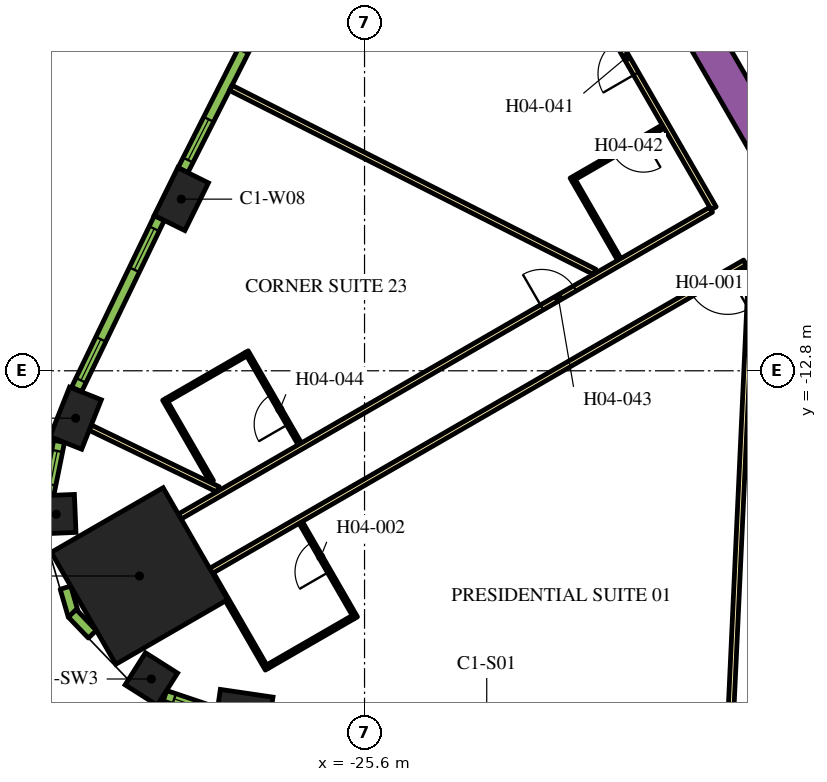
"""IFC4 building model, lengths in metres.
Left out: names, types, materials, properties, quantities, classifications, styles, units other than length and angle.
Written with IfcOpenShell. Run it as: python <this file> out.ifc"""

import sys

from ifc_helpers import new_model, si_unit, direction, frame, frame_2d, origin, origin_2d, place, context, subcontext, project, spatial, rectangle, extrude, element, fill, save


model = new_model("IFC4")
c1 = context("Model", 3, precision=1e-05, world=origin(), true_north=direction((0.0, 1.0)))
c2 = subcontext(c1, "Body", "Model", "MODEL_VIEW")
j1 = project(units=[si_unit("LENGTHUNIT", "METRE"), si_unit("PLANEANGLEUNIT", "RADIAN")], contexts=[c1])
p1 = place(None, origin())
s1 = spatial("IfcSite", under=j1, at=p1, CompositionType="ELEMENT")
p2 = place(p1, origin())
s2 = spatial("IfcBuilding", under=s1, at=p2, CompositionType="ELEMENT")
p3 = place(p2, frame((0.0, 0.0, 66.6)))
s3 = spatial("IfcBuildingStorey", under=s2, at=p3, CompositionType="ELEMENT", Elevation=66.6)
p4 = place(p3, frame((-31.522, -18.199, 0.0), z_axis=(0.0, 0.0, 1.0), x_axis=(-0.866025403784, -0.5, 0.0)))
e1 = element("IfcColumn", 1, at=p4, inside=s3, PredefinedType="COLUMN", context=c2, shape_type="SweptSolid", body=[
    extrude(rectangle(XDim=3.4, YDim=3.4, at=origin_2d()), origin(), (0.0, 0.0, 1.0), 3.9),
])
for number, where, z_axis, x_axis in (
    (2, (-28.767, -21.731, 0.0), (0.0, 0.0, 1.0), (0.989, -0.145, 0.0)),
    (3, (-30.421, -8.284, 0.0), (0.0, 0.0, 1.0), (-0.443, -0.897, 0.0)),
    (4, (-33.203, -14.047, 0.0), (0.0, 0.0, 1.0), (-0.369, -0.929, 0.0)),
):
    element("IfcColumn", number, at=place(p3, frame(where, z_axis=z_axis, x_axis=x_axis)), inside=s3, PredefinedType="COLUMN", context=c2, shape_type="SweptSolid", body=[
        extrude(rectangle(XDim=1.4, YDim=0.9, at=origin_2d()), origin(), (0.0, 0.0, 1.0), 3.9),
    ])
for number, where, z_axis, x_axis in (
    (5, (-33.713, -16.574, 0.0), (0.0, 0.0, 1.0), (0.042, -0.999, 0.0)),
    (6, (-31.21, -20.91, 0.0), (0.0, 0.0, 1.0), (0.844, -0.536, 0.0)),
):
    element("IfcColumn", number, at=place(p3, frame(where, z_axis=z_axis, x_axis=x_axis)), inside=s3, PredefinedType="COLUMN", context=c2, shape_type="SweptSolid", body=[
        extrude(rectangle(XDim=1.0, YDim=1.0, at=origin_2d()), origin(), (0.0, 0.0, 1.0), 3.9),
    ])
p5 = place(p3, frame((-12.134, -11.883, 0.0), z_axis=(0.0, 0.0, 1.0), x_axis=(-0.500005339912, 0.866022320763, 0.0)))
e7 = element("IfcWall", 7, at=p5, inside=s3, PredefinedType="SOLIDWALL", context=c2, shape_type="SweptSolid", body=[
    extrude(rectangle(XDim=9.488, YDim=0.9, at=frame_2d((4.744, 0.0))), origin(), (0.0, 0.0, 1.0), 3.9),
])
p6 = place(p3, frame((-16.412, -8.523, 0.0), z_axis=(0.0, 0.0, 1.0), x_axis=(-0.500001929737, 0.866024289647, 0.0)))
e8 = element("IfcWall", 8, at=p6, inside=s3, PredefinedType="PARTITIONING", context=c2, shape_type="SweptSolid", body=[
    extrude(rectangle(XDim=5.268, YDim=0.15, at=frame_2d((2.634, 0.0))), origin(), (0.0, 0.0, 1.0), 2.75),
])
p7 = place(p6, frame((4.088, 0.0, 0.0)))
e9 = element("IfcOpeningElement", 9, at=p7, cuts=e8, PredefinedType="OPENING", context=c2, shape_type="SweptSolid", body=[
    extrude(rectangle(XDim=1.0, YDim=2.1, at=frame_2d((0.5, 1.05))), frame((0.0, 0.085, 0.0), z_axis=(0.0, -1.0, 0.0), x_axis=(1.0, 0.0, 0.0)), (0.0, 0.0, 1.0), 0.17),
])
p8 = place(p3, frame((-30.463, -16.635, 0.0), z_axis=(0.0, 0.0, 1.0), x_axis=(0.866022394896, 0.500005211512, 0.0)))
e10 = element("IfcWall", 10, at=p8, inside=s3, PredefinedType="PARTITIONING", context=c2, shape_type="SweptSolid", body=[
    extrude(rectangle(XDim=16.144, YDim=0.15, at=frame_2d((8.072, 0.0))), origin(), (0.0, 0.0, 1.0), 2.75),
])
p9 = place(p8, frame((11.004, 0.0, 0.0)))
e11 = element("IfcOpeningElement", 11, at=p9, cuts=e10, PredefinedType="OPENING", context=c2, shape_type="SweptSolid", body=[
    extrude(rectangle(XDim=1.0, YDim=2.1, at=frame_2d((0.5, 1.05))), frame((0.0, 0.085, 0.0), z_axis=(0.0, -1.0, 0.0), x_axis=(1.0, 0.0, 0.0)), (0.0, 0.0, 1.0), 0.17),
])
p10 = place(p3, frame((-15.587, -9.952, 0.0), z_axis=(0.0, 0.0, 1.0), x_axis=(-0.866022197818, -0.500005552856, 0.0)))
e12 = element("IfcWall", 12, at=p10, inside=s3, PredefinedType="PARTITIONING", context=c2, shape_type="SweptSolid", body=[
    extrude(rectangle(XDim=16.224, YDim=0.15, at=frame_2d((8.112, 0.0))), origin(), (0.0, 0.0, 1.0), 2.75),
])
p11 = place(p10, frame((0.527, 0.0, 0.0)))
e13 = element("IfcOpeningElement", 13, at=p11, cuts=e12, PredefinedType="OPENING", context=c2, shape_type="SweptSolid", body=[
    extrude(rectangle(XDim=1.1, YDim=2.1, at=frame_2d((0.55, 1.05))), frame((0.0, 0.085, 0.0), z_axis=(0.0, -1.0, 0.0), x_axis=(1.0, 0.0, 0.0)), (0.0, 0.0, 1.0), 0.17),
])
p12 = place(p3, frame((-12.918, -14.575, 0.0), z_axis=(0.0, 0.0, 1.0), x_axis=(-0.500009150678, 0.866020120573, 0.0)))
e14 = element("IfcWall", 14, at=p12, inside=s3, PredefinedType="PARTITIONING", context=c2, shape_type="SweptSolid", body=[
    extrude(rectangle(XDim=5.258, YDim=0.15, at=frame_2d((2.629, 0.0))), origin(), (0.0, 0.0, 1.0), 2.75),
])
p13 = place(p3, frame((-32.817, -14.296, 0.0), z_axis=(0.0, 0.0, 1.0), x_axis=(0.900616957918, -0.434613730927, 0.0)))
e15 = element("IfcWall", 15, at=p13, inside=s3, PredefinedType="PARTITIONING", context=c2, shape_type="SweptSolid", body=[
    extrude(rectangle(XDim=3.733, YDim=0.15, at=frame_2d((1.867, 0.0))), origin(), (0.0, 0.0, 1.0), 2.75),
])
p14 = place(p3, frame((-29.12, -5.356, 0.0), z_axis=(0.0, 0.0, 1.0), x_axis=(0.892401965553, -0.451241323327, 0.0)))
e16 = element("IfcWall", 16, at=p14, inside=s3, PredefinedType="PARTITIONING", context=c2, shape_type="SweptSolid", body=[
    extrude(rectangle(XDim=10.729, YDim=0.15, at=frame_2d((5.364, 0.0))), origin(), (0.0, 0.0, 1.0), 2.75),
])
p15 = place(p3, frame((-15.973, -22.109, 0.0), z_axis=(0.0, 0.0, 1.0), x_axis=(0.046191717129, 0.998932592955, 0.0)))
e17 = element("IfcWall", 17, at=p15, inside=s3, PredefinedType="PARTITIONING", context=c2, shape_type="SweptSolid", body=[
    extrude(rectangle(XDim=11.638, YDim=0.15, at=frame_2d((5.819, 0.0))), origin(), (0.0, 0.0, 1.0), 2.75),
])
p16 = place(p3, frame((-25.829, -19.3, 0.0), z_axis=(0.0, 0.0, 1.0), x_axis=(-0.50005036918, 0.865996321171, 0.0)))
e18 = element("IfcWall", 18, at=p16, inside=s3, PredefinedType="PARTITIONING", context=c2, shape_type="SweptSolid", body=[
    extrude(rectangle(XDim=2.9, YDim=0.1, at=frame_2d((1.45, 0.0))), origin(), (0.0, 0.0, 1.0), 2.75),
])
p17 = place(p16, frame((1.4, 0.0, 0.0)))
e19 = element("IfcOpeningElement", 19, at=p17, cuts=e18, PredefinedType="OPENING", context=c2, shape_type="SweptSolid", body=[
    extrude(rectangle(XDim=0.9, YDim=2.1, at=frame_2d((0.45, 1.05))), frame((0.0, 0.06, 0.0), z_axis=(0.0, -1.0, 0.0), x_axis=(1.0, 0.0, 0.0)), (0.0, 0.0, 1.0), 0.12),
])
p18 = place(p3, frame((-25.897, -19.282, 0.0), z_axis=(0.0, 0.0, 1.0), x_axis=(-0.866021400173, -0.500006934395, 0.0)))
e20 = element("IfcWall", 20, at=p18, inside=s3, PredefinedType="PARTITIONING", context=c2, shape_type="SweptSolid", body=[
    extrude(rectangle(XDim=2.6, YDim=0.1, at=frame_2d((1.3, 0.0))), origin(), (0.0, 0.0, 1.0), 2.75),
])
p19 = place(p3, frame((-29.617, -18.139, 0.0), z_axis=(0.0, 0.0, 1.0), x_axis=(0.499987231761, -0.866032775405, 0.0)))
e21 = element("IfcWall", 21, at=p19, inside=s3, PredefinedType="PARTITIONING", context=c2, shape_type="SweptSolid", body=[
    extrude(rectangle(XDim=2.9, YDim=0.1, at=frame_2d((1.45, 0.0))), origin(), (0.0, 0.0, 1.0), 2.75),
])
p20 = place(p3, frame((-17.74, -6.373, 0.0), z_axis=(0.0, 0.0, 1.0), x_axis=(-0.866018616679, -0.500011755427, 0.0)))
e22 = element("IfcWall", 22, at=p20, inside=s3, PredefinedType="PARTITIONING", context=c2, shape_type="SweptSolid", body=[
    extrude(rectangle(XDim=2.8, YDim=0.1, at=frame_2d((1.4, 0.0))), origin(), (0.0, 0.0, 1.0), 2.75),
])
p21 = place(p20, frame((0.6, 0.0, 0.0)))
e23 = element("IfcOpeningElement", 23, at=p21, cuts=e22, PredefinedType="OPENING", context=c2, shape_type="SweptSolid", body=[
    extrude(rectangle(XDim=0.9, YDim=2.1, at=frame_2d((0.45, 1.05))), frame((0.0, 0.06, 0.0), z_axis=(0.0, -1.0, 0.0), x_axis=(1.0, 0.0, 0.0)), (0.0, 0.0, 1.0), 0.12),
])
p22 = place(p3, frame((-20.092, -7.8, 0.0), z_axis=(0.0, 0.0, 1.0), x_axis=(0.499940577336, -0.866059708757, 0.0)))
e24 = element("IfcWall", 24, at=p22, inside=s3, PredefinedType="PARTITIONING", context=c2, shape_type="SweptSolid", body=[
    extrude(rectangle(XDim=2.39, YDim=0.1, at=frame_2d((1.195, 0.0))), origin(), (0.0, 0.0, 1.0), 2.75),
])
p23 = place(p3, frame((-27.304, -14.725, 0.0), z_axis=(0.0, 0.0, 1.0), x_axis=(-0.49998411664, 0.866034573852, 0.0)))
e25 = element("IfcWall", 25, at=p23, inside=s3, PredefinedType="PARTITIONING", context=c2, shape_type="SweptSolid", body=[
    extrude(rectangle(XDim=2.8, YDim=0.1, at=frame_2d((1.4, 0.0))), origin(), (0.0, 0.0, 1.0), 2.75),
])
p24 = place(p23, frame((0.6, 0.0, 0.0)))
e26 = element("IfcOpeningElement", 26, at=p24, cuts=e25, PredefinedType="OPENING", context=c2, shape_type="SweptSolid", body=[
    extrude(rectangle(XDim=0.9, YDim=2.1, at=frame_2d((0.45, 1.05))), frame((0.0, 0.06, 0.0), z_axis=(0.0, -1.0, 0.0), x_axis=(1.0, 0.0, 0.0)), (0.0, 0.0, 1.0), 0.12),
])
p25 = place(p3, frame((-28.722, -12.368, 0.0), z_axis=(0.0, 0.0, 1.0), x_axis=(-0.866050077142, -0.499957262057, 0.0)))
e27 = element("IfcWall", 27, at=p25, inside=s3, PredefinedType="PARTITIONING", context=c2, shape_type="SweptSolid", body=[
    extrude(rectangle(XDim=2.4, YDim=0.1, at=frame_2d((1.2, 0.0))), origin(), (0.0, 0.0, 1.0), 2.75),
])
p26 = place(p3, frame((-29.619, -15.715, 0.0), z_axis=(0.0, 0.0, 1.0), x_axis=(-0.500004234368, 0.866022959057, 0.0)))
e28 = element("IfcWall", 28, at=p26, inside=s3, PredefinedType="PARTITIONING", context=c2, shape_type="SweptSolid", body=[
    extrude(rectangle(XDim=2.5, YDim=0.1, at=frame_2d((1.25, 0.0))), origin(), (0.0, 0.0, 1.0), 2.75),
])
p27 = place(p3, frame((-28.122, -3.06, 0.0), z_axis=(0.0, 0.0, 1.0), x_axis=(-0.451233929645, -0.892405704115, 0.0)))
e29 = element("IfcWall", 29, at=p27, inside=s3, PredefinedType="SOLIDWALL", context=c2, shape_type="SweptSolid", body=[
    extrude(rectangle(XDim=4.998, YDim=0.29, at=frame_2d((2.499, 0.0))), origin(), (0.0, 0.0, 1.0), 3.65),
])
p28 = place(p27, frame((0.297, 0.0, 0.9)))
e30 = element("IfcOpeningElement", 30, at=p28, cuts=e29, PredefinedType="OPENING", context=c2, shape_type="SweptSolid", body=[
    extrude(rectangle(XDim=1.2, YDim=2.15, at=frame_2d((0.6, 1.075))), frame((0.0, 0.155, 0.0), z_axis=(0.0, -1.0, 0.0), x_axis=(1.0, 0.0, 0.0)), (0.0, 0.0, 1.0), 0.31),
])
p29 = place(p27, frame((3.501, 0.0, 0.9)))
e31 = element("IfcOpeningElement", 31, at=p29, cuts=e29, PredefinedType="OPENING", context=c2, shape_type="SweptSolid", body=[
    extrude(rectangle(XDim=1.2, YDim=2.15, at=frame_2d((0.6, 1.075))), frame((0.0, 0.155, 0.0), z_axis=(0.0, -1.0, 0.0), x_axis=(1.0, 0.0, 0.0)), (0.0, 0.0, 1.0), 0.31),
])
p30 = place(p3, frame((-31.0, -8.782, 0.0), z_axis=(0.0, 0.0, 1.0), x_axis=(-0.434664499056, -0.900592456808, 0.0)))
e32 = element("IfcWall", 32, at=p30, inside=s3, PredefinedType="SOLIDWALL", context=c2, shape_type="SweptSolid", body=[
    extrude(rectangle(XDim=5.006, YDim=0.29, at=frame_2d((2.503, 0.0))), origin(), (0.0, 0.0, 1.0), 3.65),
])
p31 = place(p30, frame((0.31, 0.0, 0.9)))
e33 = element("IfcOpeningElement", 33, at=p31, cuts=e32, PredefinedType="OPENING", context=c2, shape_type="SweptSolid", body=[
    extrude(rectangle(XDim=1.2, YDim=2.15, at=frame_2d((0.6, 1.075))), frame((0.0, 0.155, 0.0), z_axis=(0.0, -1.0, 0.0), x_axis=(1.0, 0.0, 0.0)), (0.0, 0.0, 1.0), 0.31),
])
p32 = place(p30, frame((3.541, 0.0, 0.9)))
e34 = element("IfcOpeningElement", 34, at=p32, cuts=e32, PredefinedType="OPENING", context=c2, shape_type="SweptSolid", body=[
    extrude(rectangle(XDim=1.2, YDim=2.15, at=frame_2d((0.6, 1.075))), frame((0.0, 0.155, 0.0), z_axis=(0.0, -1.0, 0.0), x_axis=(1.0, 0.0, 0.0)), (0.0, 0.0, 1.0), 0.31),
])
p33 = place(p3, frame((-33.637, -14.657, 0.0), z_axis=(0.0, 0.0, 1.0), x_axis=(-0.198106888228, -0.980180422594, 0.0)))
e35 = element("IfcWall", 35, at=p33, inside=s3, PredefinedType="SOLIDWALL", context=c2, shape_type="SweptSolid", body=[
    extrude(rectangle(XDim=1.415, YDim=0.29, at=frame_2d((0.708, 0.0))), origin(), (0.0, 0.0, 1.0), 3.65),
])
p34 = place(p33, frame((0.257, 0.0, 0.9)))
e36 = element("IfcOpeningElement", 36, at=p34, cuts=e35, PredefinedType="OPENING", context=c2, shape_type="SweptSolid", body=[
    extrude(rectangle(XDim=0.9, YDim=2.15, at=frame_2d((0.45, 1.075))), frame((0.0, 0.155, 0.0), z_axis=(0.0, -1.0, 0.0), x_axis=(1.0, 0.0, 0.0)), (0.0, 0.0, 1.0), 0.31),
])
for number, where, z_axis, x_axis in (
    (37, (-33.47, -18.507, 0.0), (0.0, 0.0, 1.0), (0.279, -0.96, 0.0)),
    (38, (-33.291, -19.181, 0.0), (0.0, 0.0, 1.0), (0.692, -0.722, 0.0)),
):
    element("IfcWall", number, at=place(p3, frame(where, z_axis=z_axis, x_axis=x_axis)), inside=s3, PredefinedType="SOLIDWALL", context=c2, shape_type="SweptSolid", body=[
        extrude(rectangle(XDim=0.764, YDim=0.29, at=frame_2d((0.382, 0.0))), origin(), (0.0, 0.0, 1.0), 3.65),
    ])
p35 = place(p3, frame((-30.853, -21.352, 0.0), z_axis=(0.0, 0.0, 1.0), x_axis=(0.947903891592, -0.318556450734, 0.0)))
e39 = element("IfcWall", 39, at=p35, inside=s3, PredefinedType="SOLIDWALL", context=c2, shape_type="SweptSolid", body=[
    extrude(rectangle(XDim=1.415, YDim=0.29, at=frame_2d((0.708, 0.0))), origin(), (0.0, 0.0, 1.0), 3.65),
])
p36 = place(p35, frame((0.257, 0.0, 0.9)))
e40 = element("IfcOpeningElement", 40, at=p36, cuts=e39, PredefinedType="OPENING", context=c2, shape_type="SweptSolid", body=[
    extrude(rectangle(XDim=0.9, YDim=2.15, at=frame_2d((0.45, 1.075))), frame((0.0, 0.155, 0.0), z_axis=(0.0, -1.0, 0.0), x_axis=(1.0, 0.0, 0.0)), (0.0, 0.0, 1.0), 0.31),
])
p37 = place(p11, origin())
e41 = element("IfcDoor", 41, at=p37, inside=s3, OperationType="SINGLE_SWING_LEFT", PredefinedType="DOOR", context=c2, shape_type="SweptSolid", body=[
    extrude(rectangle(XDim=1.1, YDim=2.1, at=frame_2d((0.55, 1.05))), frame((0.0, 0.025, 0.0), z_axis=(0.0, -1.0, 0.0), x_axis=(1.0, 0.0, 0.0)), (0.0, 0.0, 1.0), 0.05),
])
fill(e13, e41)
p38 = place(p17, origin())
e42 = element("IfcDoor", 42, at=p38, inside=s3, OperationType="SINGLE_SWING_LEFT", PredefinedType="DOOR", context=c2, shape_type="SweptSolid", body=[
    extrude(rectangle(XDim=0.9, YDim=2.1, at=frame_2d((0.45, 1.05))), frame((0.0, 0.025, 0.0), z_axis=(0.0, -1.0, 0.0), x_axis=(1.0, 0.0, 0.0)), (0.0, 0.0, 1.0), 0.05),
])
fill(e19, e42)
p39 = place(p7, origin())
e43 = element("IfcDoor", 43, at=p39, inside=s3, OperationType="SINGLE_SWING_RIGHT", PredefinedType="DOOR", context=c2, shape_type="SweptSolid", body=[
    extrude(rectangle(XDim=1.0, YDim=2.1, at=frame_2d((0.5, 1.05))), frame((0.0, 0.025, 0.0), z_axis=(0.0, -1.0, 0.0), x_axis=(1.0, 0.0, 0.0)), (0.0, 0.0, 1.0), 0.05),
])
fill(e9, e43)
p40 = place(p21, origin())
e44 = element("IfcDoor", 44, at=p40, inside=s3, OperationType="SINGLE_SWING_LEFT", PredefinedType="DOOR", context=c2, shape_type="SweptSolid", body=[
    extrude(rectangle(XDim=0.9, YDim=2.1, at=frame_2d((0.45, 1.05))), frame((0.0, 0.025, 0.0), z_axis=(0.0, -1.0, 0.0), x_axis=(1.0, 0.0, 0.0)), (0.0, 0.0, 1.0), 0.05),
])
fill(e23, e44)
p41 = place(p9, origin())
e45 = element("IfcDoor", 45, at=p41, inside=s3, OperationType="SINGLE_SWING_RIGHT", PredefinedType="DOOR", context=c2, shape_type="SweptSolid", body=[
    extrude(rectangle(XDim=1.0, YDim=2.1, at=frame_2d((0.5, 1.05))), frame((0.0, 0.025, 0.0), z_axis=(0.0, -1.0, 0.0), x_axis=(1.0, 0.0, 0.0)), (0.0, 0.0, 1.0), 0.05),
])
fill(e11, e45)
p42 = place(p24, origin())
e46 = element("IfcDoor", 46, at=p42, inside=s3, OperationType="SINGLE_SWING_LEFT", PredefinedType="DOOR", context=c2, shape_type="SweptSolid", body=[
    extrude(rectangle(XDim=0.9, YDim=2.1, at=frame_2d((0.45, 1.05))), frame((0.0, 0.025, 0.0), z_axis=(0.0, -1.0, 0.0), x_axis=(1.0, 0.0, 0.0)), (0.0, 0.0, 1.0), 0.05),
])
fill(e26, e46)
p43 = place(p29, origin())
e47 = element("IfcWindow", 47, at=p43, inside=s3, PartitioningType="DOUBLE_PANEL_VERTICAL", PredefinedType="WINDOW", context=c2, shape_type="SweptSolid", body=[
    extrude(rectangle(XDim=1.2, YDim=2.15, at=frame_2d((0.6, 1.075))), frame((0.0, 0.015, 0.0), z_axis=(0.0, -1.0, 0.0), x_axis=(1.0, 0.0, 0.0)), (0.0, 0.0, 1.0), 0.06),
])
fill(e31, e47)
p44 = place(p31, origin())
e48 = element("IfcWindow", 48, at=p44, inside=s3, PartitioningType="DOUBLE_PANEL_VERTICAL", PredefinedType="WINDOW", context=c2, shape_type="SweptSolid", body=[
    extrude(rectangle(XDim=1.2, YDim=2.15, at=frame_2d((0.6, 1.075))), frame((0.0, 0.015, 0.0), z_axis=(0.0, -1.0, 0.0), x_axis=(1.0, 0.0, 0.0)), (0.0, 0.0, 1.0), 0.06),
])
fill(e33, e48)
p45 = place(p32, origin())
e49 = element("IfcWindow", 49, at=p45, inside=s3, PartitioningType="DOUBLE_PANEL_VERTICAL", PredefinedType="WINDOW", context=c2, shape_type="SweptSolid", body=[
    extrude(rectangle(XDim=1.2, YDim=2.15, at=frame_2d((0.6, 1.075))), frame((0.0, 0.015, 0.0), z_axis=(0.0, -1.0, 0.0), x_axis=(1.0, 0.0, 0.0)), (0.0, 0.0, 1.0), 0.06),
])
fill(e34, e49)
p46 = place(p34, origin())
e50 = element("IfcWindow", 50, at=p46, inside=s3, PartitioningType="SINGLE_PANEL", PredefinedType="WINDOW", context=c2, shape_type="SweptSolid", body=[
    extrude(rectangle(XDim=0.9, YDim=2.15, at=frame_2d((0.45, 1.075))), frame((0.0, 0.015, 0.0), z_axis=(0.0, -1.0, 0.0), x_axis=(1.0, 0.0, 0.0)), (0.0, 0.0, 1.0), 0.06),
])
fill(e36, e50)
p47 = place(p36, origin())
e51 = element("IfcWindow", 51, at=p47, inside=s3, PartitioningType="SINGLE_PANEL", PredefinedType="WINDOW", context=c2, shape_type="SweptSolid", body=[
    extrude(rectangle(XDim=0.9, YDim=2.15, at=frame_2d((0.45, 1.075))), frame((0.0, 0.015, 0.0), z_axis=(0.0, -1.0, 0.0), x_axis=(1.0, 0.0, 0.0)), (0.0, 0.0, 1.0), 0.06),
])
fill(e40, e51)
save(model, sys.argv[1])
